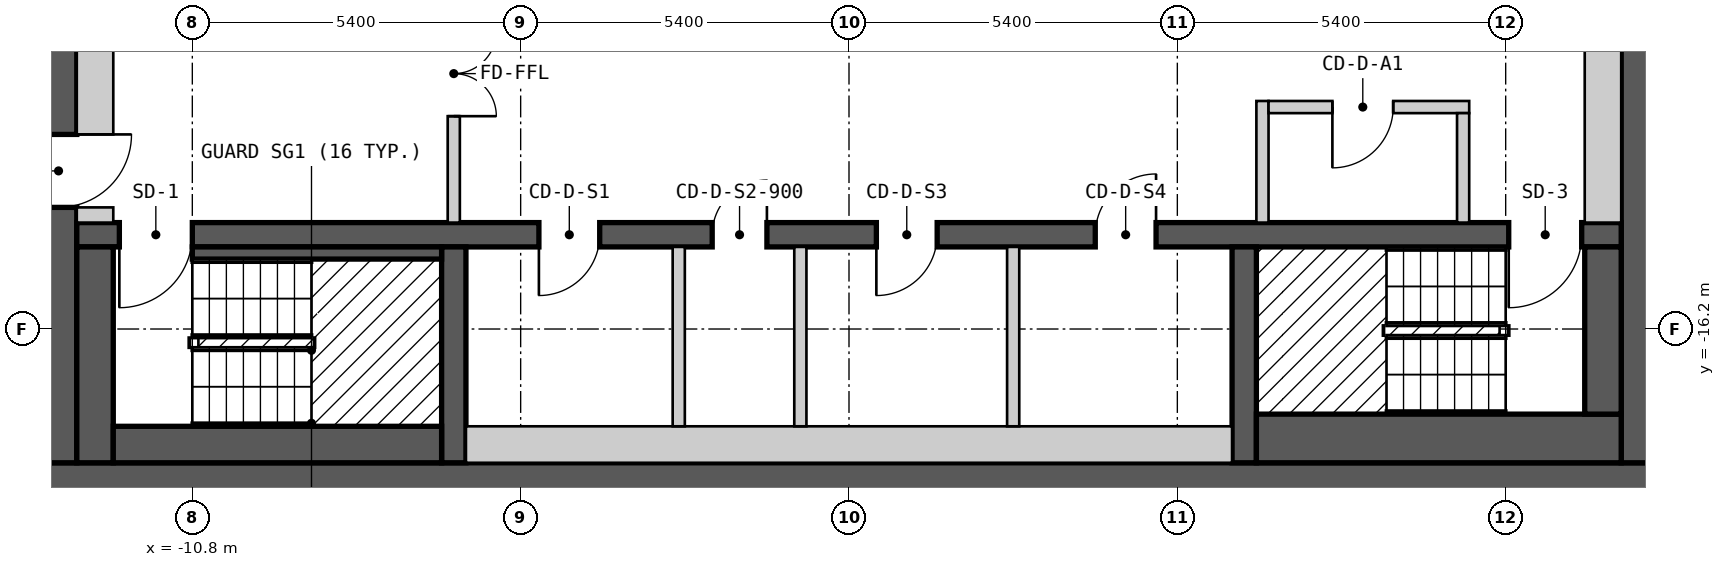
"""IFC4 building model, lengths in metres.
Left out: names, types, materials, properties, quantities, classifications, styles, units other than length and angle.
Written with IfcOpenShell. Run it as: python <this file> out.ifc"""

import sys

from ifc_helpers import new_model, si_unit, direction, frame, frame_2d, origin, place, context, subcontext, project, spatial, rectangle, extrude, element, fill, save


model = new_model("IFC4")
c1 = context("Model", 3, precision=1e-05, world=origin(), true_north=direction((0.0, 1.0)))
c2 = subcontext(c1, "Body", "Model", "MODEL_VIEW")
j1 = project(units=[si_unit("LENGTHUNIT", "METRE"), si_unit("PLANEANGLEUNIT", "RADIAN")], contexts=[c1])
p1 = place(None, origin())
s1 = spatial("IfcSite", under=j1, at=p1, CompositionType="ELEMENT")
p2 = place(p1, origin())
s2 = spatial("IfcBuilding", under=s1, at=p2, CompositionType="ELEMENT")
p3 = place(p2, frame((0.0, 0.0, 166.2)))
s3 = spatial("IfcBuildingStorey", under=s2, at=p3, CompositionType="ELEMENT", Elevation=166.2)
p4 = place(p3, frame((-13.3, -18.7, 0.0), z_axis=(0.0, 0.0, 1.0), x_axis=(1.0, 0.0, 0.0)))
e1 = element("IfcWall", 1, at=p4, inside=s3, PredefinedType="SHEAR", context=c2, shape_type="SweptSolid", body=[
    extrude(rectangle(XDim=26.6, YDim=0.6, at=frame_2d((13.3, 0.0))), origin(), (0.0, 0.0, 1.0), 2.7),
])
p5 = place(p3, frame((-13.0, -18.4, 0.0), z_axis=(0.0, 0.0, 1.0), x_axis=(0.0, 1.0, 0.0)))
e2 = element("IfcWall", 2, at=p5, inside=s3, PredefinedType="SHEAR", context=c2, shape_type="SweptSolid", body=[
    extrude(rectangle(XDim=12.8, YDim=0.6, at=frame_2d((6.4, 0.0))), origin(), (0.0, 0.0, 1.0), 2.7),
])
p6 = place(p5, frame((4.2, 0.0, 0.0)))
e3 = element("IfcOpeningElement", 3, at=p6, cuts=e2, PredefinedType="OPENING", context=c2, shape_type="SweptSolid", body=[
    extrude(rectangle(XDim=1.2, YDim=2.1, at=frame_2d((0.6, 1.05))), frame((0.0, 0.31, 0.0), z_axis=(0.0, -1.0, 0.0), x_axis=(1.0, 0.0, 0.0)), (0.0, 0.0, 1.0), 0.62),
])
p7 = place(p3, frame((13.0, -18.4, 0.0), z_axis=(0.0, 0.0, 1.0), x_axis=(0.0, 1.0, 0.0)))
e4 = element("IfcWall", 4, at=p7, inside=s3, PredefinedType="SHEAR", context=c2, shape_type="SweptSolid", body=[
    extrude(rectangle(XDim=12.8, YDim=0.6, at=frame_2d((6.4, 0.0))), origin(), (0.0, 0.0, 1.0), 2.7),
])
p8 = place(p3, frame((-12.7, -14.65, 0.0), z_axis=(0.0, 0.0, 1.0), x_axis=(1.0, 0.0, 0.0)))
e5 = element("IfcWall", 5, at=p8, inside=s3, PredefinedType="SHEAR", context=c2, shape_type="SweptSolid", body=[
    extrude(rectangle(XDim=25.4, YDim=0.4, at=frame_2d((12.7, 0.0))), origin(), (0.0, 0.0, 1.0), 2.7),
])
p9 = place(p8, frame((1.9, 0.0, 0.0), z_axis=(0.0, 0.0, 1.0), x_axis=(-1.0, 0.0, 0.0)))
e6 = element("IfcOpeningElement", 6, at=p9, cuts=e5, PredefinedType="OPENING", context=c2, shape_type="SweptSolid", body=[
    extrude(rectangle(XDim=1.2, YDim=2.1, at=frame_2d((0.6, 1.05))), frame((0.0, 0.21, 0.0), z_axis=(0.0, -1.0, 0.0), x_axis=(1.0, 0.0, 0.0)), (0.0, 0.0, 1.0), 0.42),
])
p10 = place(p8, frame((24.75, 0.0, 0.0), z_axis=(0.0, 0.0, 1.0), x_axis=(-1.0, 0.0, 0.0)))
e7 = element("IfcOpeningElement", 7, at=p10, cuts=e5, PredefinedType="OPENING", context=c2, shape_type="SweptSolid", body=[
    extrude(rectangle(XDim=1.2, YDim=2.1, at=frame_2d((0.6, 1.05))), frame((0.0, 0.21, 0.0), z_axis=(0.0, -1.0, 0.0), x_axis=(1.0, 0.0, 0.0)), (0.0, 0.0, 1.0), 0.42),
])
p11 = place(p8, frame((8.6, 0.0, 0.0), z_axis=(0.0, 0.0, 1.0), x_axis=(-1.0, 0.0, 0.0)))
e8 = element("IfcOpeningElement", 8, at=p11, cuts=e5, PredefinedType="OPENING", context=c2, shape_type="SweptSolid", body=[
    extrude(rectangle(XDim=1.0, YDim=2.1, at=frame_2d((0.5, 1.05))), frame((0.0, 0.21, 0.0), z_axis=(0.0, -1.0, 0.0), x_axis=(1.0, 0.0, 0.0)), (0.0, 0.0, 1.0), 0.42),
])
p12 = place(p8, frame((11.35, 0.0, 0.0), z_axis=(0.0, 0.0, 1.0), x_axis=(-1.0, 0.0, 0.0)))
e9 = element("IfcOpeningElement", 9, at=p12, cuts=e5, PredefinedType="OPENING", context=c2, shape_type="SweptSolid", body=[
    extrude(rectangle(XDim=0.9, YDim=2.1, at=frame_2d((0.45, 1.05))), frame((0.0, 0.21, 0.0), z_axis=(0.0, -1.0, 0.0), x_axis=(1.0, 0.0, 0.0)), (0.0, 0.0, 1.0), 0.42),
])
p13 = place(p8, frame((14.15, 0.0, 0.0), z_axis=(0.0, 0.0, 1.0), x_axis=(-1.0, 0.0, 0.0)))
e10 = element("IfcOpeningElement", 10, at=p13, cuts=e5, PredefinedType="OPENING", context=c2, shape_type="SweptSolid", body=[
    extrude(rectangle(XDim=1.0, YDim=2.1, at=frame_2d((0.5, 1.05))), frame((0.0, 0.21, 0.0), z_axis=(0.0, -1.0, 0.0), x_axis=(1.0, 0.0, 0.0)), (0.0, 0.0, 1.0), 0.42),
])
p14 = place(p8, frame((17.75, 0.0, 0.0), z_axis=(0.0, 0.0, 1.0), x_axis=(-1.0, 0.0, 0.0)))
e11 = element("IfcOpeningElement", 11, at=p14, cuts=e5, PredefinedType="OPENING", context=c2, shape_type="SweptSolid", body=[
    extrude(rectangle(XDim=1.0, YDim=2.1, at=frame_2d((0.5, 1.05))), frame((0.0, 0.21, 0.0), z_axis=(0.0, -1.0, 0.0), x_axis=(1.0, 0.0, 0.0)), (0.0, 0.0, 1.0), 0.42),
])
for number, where, z_axis, x_axis in (
    (12, (-6.5, -18.4, 0.0), (0.0, 0.0, 1.0), (0.0, 1.0, 0.0)),
    (13, (6.5, -18.4, 0.0), (0.0, 0.0, 1.0), (0.0, 1.0, 0.0)),
):
    element("IfcWall", number, at=place(p3, frame(where, z_axis=z_axis, x_axis=x_axis)), inside=s3, PredefinedType="SHEAR", context=c2, shape_type="SweptSolid", body=[
        extrude(rectangle(XDim=3.55, YDim=0.4, at=frame_2d((1.775, 0.0))), origin(), (0.0, 0.0, 1.0), 2.7),
    ])
p15 = place(p3, frame((-12.4, -18.4, 0.0), z_axis=(0.0, 0.0, 1.0), x_axis=(0.0, 1.0, 0.0)))
e14 = element("IfcWall", 14, at=p15, inside=s3, PredefinedType="SOLIDWALL", context=c2, shape_type="SweptSolid", body=[
    extrude(rectangle(XDim=3.55, YDim=0.6, at=frame_2d((1.775, 0.0))), origin(), (0.0, 0.0, 1.0), 2.7),
])
p16 = place(p3, frame((-12.7, -14.325, 0.0), z_axis=(0.0, 0.0, 1.0), x_axis=(1.0, 0.0, 0.0)))
e15 = element("IfcWall", 15, at=p16, inside=s3, PredefinedType="PARTITIONING", context=c2, shape_type="SweptSolid", body=[
    extrude(rectangle(XDim=0.6, YDim=0.25, at=frame_2d((0.3, 0.0))), origin(), (0.0, 0.0, 1.0), 2.7),
])
p17 = place(p3, frame((-12.4, -13.0, 0.0), z_axis=(0.0, 0.0, 1.0), x_axis=(0.0, 1.0, 0.0)))
e16 = element("IfcWall", 16, at=p17, inside=s3, PredefinedType="PARTITIONING", context=c2, shape_type="SweptSolid", body=[
    extrude(rectangle(XDim=3.45, YDim=0.6, at=frame_2d((1.725, 0.0))), origin(), (0.0, 0.0, 1.0), 2.7),
])
p18 = place(p3, frame((-12.1, -18.1, 0.0), z_axis=(0.0, 0.0, 1.0), x_axis=(1.0, 0.0, 0.0)))
e17 = element("IfcWall", 17, at=p18, inside=s3, PredefinedType="SOLIDWALL", context=c2, shape_type="SweptSolid", body=[
    extrude(rectangle(XDim=5.4, YDim=0.6, at=frame_2d((2.7, 0.0))), origin(), (0.0, 0.0, 1.0), 2.7),
])
p19 = place(p3, frame((-10.8, -14.95, 0.0), z_axis=(0.0, 0.0, 1.0), x_axis=(1.0, 0.0, 0.0)))
e18 = element("IfcWall", 18, at=p19, inside=s3, PredefinedType="SOLIDWALL", context=c2, shape_type="SweptSolid", body=[
    extrude(rectangle(XDim=4.1, YDim=0.2, at=frame_2d((2.05, 0.0))), origin(), (0.0, 0.0, 1.0), 2.7),
])
p20 = place(p3, frame((-6.5, -14.45, 0.0), z_axis=(0.0, 0.0, 1.0), x_axis=(0.0, 1.0, 0.0)))
e19 = element("IfcWall", 19, at=p20, inside=s3, PredefinedType="PARTITIONING", context=c2, shape_type="SweptSolid", body=[
    extrude(rectangle(XDim=4.9, YDim=0.2, at=frame_2d((2.45, 0.0))), origin(), (0.0, 0.0, 1.0), 2.7),
])
p21 = place(p20, frame((3.15, 0.0, 0.0), z_axis=(0.0, 0.0, 1.0), x_axis=(-1.0, 0.0, 0.0)))
e20 = element("IfcOpeningElement", 20, at=p21, cuts=e19, PredefinedType="OPENING", context=c2, shape_type="SweptSolid", body=[
    extrude(rectangle(XDim=1.4, YDim=2.1, at=frame_2d((0.7, 1.05))), frame((0.0, 0.11, 0.0), z_axis=(0.0, -1.0, 0.0), x_axis=(1.0, 0.0, 0.0)), (0.0, 0.0, 1.0), 0.22),
])
p22 = place(p3, frame((-6.3, -18.1, 0.0), z_axis=(0.0, 0.0, 1.0), x_axis=(1.0, 0.0, 0.0)))
e21 = element("IfcWall", 21, at=p22, inside=s3, PredefinedType="PARTITIONING", context=c2, shape_type="SweptSolid", body=[
    extrude(rectangle(XDim=12.6, YDim=0.6, at=frame_2d((6.3, 0.0))), origin(), (0.0, 0.0, 1.0), 2.7),
])
for number, where, z_axis, x_axis in (
    (22, (-2.8, -17.8, 0.0), (0.0, 0.0, 1.0), (0.0, 1.0, 0.0)),
    (23, (-0.8, -17.8, 0.0), (0.0, 0.0, 1.0), (0.0, 1.0, 0.0)),
    (24, (2.7, -17.8, 0.0), (0.0, 0.0, 1.0), (0.0, 1.0, 0.0)),
):
    element("IfcWall", number, at=place(p3, frame(where, z_axis=z_axis, x_axis=x_axis)), inside=s3, PredefinedType="PARTITIONING", context=c2, shape_type="SweptSolid", body=[
        extrude(rectangle(XDim=2.95, YDim=0.2, at=frame_2d((1.475, 0.0))), origin(), (0.0, 0.0, 1.0), 2.7),
    ])
p23 = place(p3, frame((6.7, -18.0, 0.0), z_axis=(0.0, 0.0, 1.0), x_axis=(1.0, 0.0, 0.0)))
e25 = element("IfcWall", 25, at=p23, inside=s3, PredefinedType="SOLIDWALL", context=c2, shape_type="SweptSolid", body=[
    extrude(rectangle(XDim=6.0, YDim=0.8, at=frame_2d((3.0, 0.0))), origin(), (0.0, 0.0, 1.0), 2.7),
])
p24 = place(p3, frame((6.8, -14.45, 0.0), z_axis=(0.0, 0.0, 1.0), x_axis=(0.0, 1.0, 0.0)))
e26 = element("IfcWall", 26, at=p24, inside=s3, PredefinedType="PARTITIONING", context=c2, shape_type="SweptSolid", body=[
    extrude(rectangle(XDim=2.0, YDim=0.2, at=frame_2d((1.0, 0.0))), origin(), (0.0, 0.0, 1.0), 2.7),
])
p25 = place(p3, frame((6.9, -12.55, 0.0), z_axis=(0.0, 0.0, 1.0), x_axis=(1.0, 0.0, 0.0)))
e27 = element("IfcWall", 27, at=p25, inside=s3, PredefinedType="PARTITIONING", context=c2, shape_type="SweptSolid", body=[
    extrude(rectangle(XDim=3.3, YDim=0.2, at=frame_2d((1.65, 0.0))), origin(), (0.0, 0.0, 1.0), 2.7),
])
p26 = place(p25, frame((2.05, 0.0, 0.0), z_axis=(0.0, 0.0, 1.0), x_axis=(-1.0, 0.0, 0.0)))
e28 = element("IfcOpeningElement", 28, at=p26, cuts=e27, PredefinedType="OPENING", context=c2, shape_type="SweptSolid", body=[
    extrude(rectangle(XDim=1.0, YDim=2.1, at=frame_2d((0.5, 1.05))), frame((0.0, 0.11, 0.0), z_axis=(0.0, -1.0, 0.0), x_axis=(1.0, 0.0, 0.0)), (0.0, 0.0, 1.0), 0.22),
])
p27 = place(p3, frame((10.1, -14.45, 0.0), z_axis=(0.0, 0.0, 1.0), x_axis=(0.0, 1.0, 0.0)))
e29 = element("IfcWall", 29, at=p27, inside=s3, PredefinedType="PARTITIONING", context=c2, shape_type="SweptSolid", body=[
    extrude(rectangle(XDim=1.8, YDim=0.2, at=frame_2d((0.9, 0.0))), origin(), (0.0, 0.0, 1.0), 2.7),
])
p28 = place(p3, frame((12.4, -17.6, 0.0), z_axis=(0.0, 0.0, 1.0), x_axis=(0.0, 1.0, 0.0)))
e30 = element("IfcWall", 30, at=p28, inside=s3, PredefinedType="SOLIDWALL", context=c2, shape_type="SweptSolid", body=[
    extrude(rectangle(XDim=2.75, YDim=0.6, at=frame_2d((1.375, 0.0))), origin(), (0.0, 0.0, 1.0), 2.7),
])
p29 = place(p3, frame((12.4, -14.45, 0.0), z_axis=(0.0, 0.0, 1.0), x_axis=(0.0, 1.0, 0.0)))
e31 = element("IfcWall", 31, at=p29, inside=s3, PredefinedType="PARTITIONING", context=c2, shape_type="SweptSolid", body=[
    extrude(rectangle(XDim=8.25, YDim=0.6, at=frame_2d((4.125, 0.0))), origin(), (0.0, 0.0, 1.0), 2.7),
])
p30 = place(p9, origin())
e32 = element("IfcDoor", 32, at=p30, inside=s3, OperationType="SINGLE_SWING_RIGHT", PredefinedType="DOOR", context=c2, shape_type="SweptSolid", body=[
    extrude(rectangle(XDim=1.2, YDim=2.1, at=frame_2d((0.6, 1.05))), frame((0.0, 0.025, 0.0), z_axis=(0.0, -1.0, 0.0), x_axis=(1.0, 0.0, 0.0)), (0.0, 0.0, 1.0), 0.05),
])
fill(e6, e32)
p31 = place(p10, origin())
e33 = element("IfcDoor", 33, at=p31, inside=s3, OperationType="SINGLE_SWING_RIGHT", PredefinedType="DOOR", context=c2, shape_type="SweptSolid", body=[
    extrude(rectangle(XDim=1.2, YDim=2.1, at=frame_2d((0.6, 1.05))), frame((0.0, 0.025, 0.0), z_axis=(0.0, -1.0, 0.0), x_axis=(1.0, 0.0, 0.0)), (0.0, 0.0, 1.0), 0.05),
])
fill(e7, e33)
p32 = place(p6, origin())
e34 = element("IfcDoor", 34, at=p32, inside=s3, OperationType="SINGLE_SWING_RIGHT", PredefinedType="DOOR", context=c2, shape_type="SweptSolid", body=[
    extrude(rectangle(XDim=1.2, YDim=2.1, at=frame_2d((0.6, 1.05))), frame((0.0, 0.025, 0.0), z_axis=(0.0, -1.0, 0.0), x_axis=(1.0, 0.0, 0.0)), (0.0, 0.0, 1.0), 0.05),
])
fill(e3, e34)
p33 = place(p21, origin())
e35 = element("IfcDoor", 35, at=p33, inside=s3, OperationType="DOUBLE_DOOR_SINGLE_SWING", PredefinedType="DOOR", context=c2, shape_type="SweptSolid", body=[
    extrude(rectangle(XDim=1.4, YDim=2.1, at=frame_2d((0.7, 1.05))), frame((0.0, 0.025, 0.0), z_axis=(0.0, -1.0, 0.0), x_axis=(1.0, 0.0, 0.0)), (0.0, 0.0, 1.0), 0.05),
])
fill(e20, e35)
p34 = place(p26, origin())
e36 = element("IfcDoor", 36, at=p34, inside=s3, OperationType="SINGLE_SWING_RIGHT", PredefinedType="DOOR", context=c2, shape_type="SweptSolid", body=[
    extrude(rectangle(XDim=1.0, YDim=2.1, at=frame_2d((0.5, 1.05))), frame((0.0, 0.025, 0.0), z_axis=(0.0, -1.0, 0.0), x_axis=(1.0, 0.0, 0.0)), (0.0, 0.0, 1.0), 0.05),
])
fill(e28, e36)
p35 = place(p11, origin())
e37 = element("IfcDoor", 37, at=p35, inside=s3, OperationType="SINGLE_SWING_RIGHT", PredefinedType="DOOR", context=c2, shape_type="SweptSolid", body=[
    extrude(rectangle(XDim=1.0, YDim=2.1, at=frame_2d((0.5, 1.05))), frame((0.0, 0.025, 0.0), z_axis=(0.0, -1.0, 0.0), x_axis=(1.0, 0.0, 0.0)), (0.0, 0.0, 1.0), 0.05),
])
fill(e8, e37)
p36 = place(p12, origin())
e38 = element("IfcDoor", 38, at=p36, inside=s3, OperationType="SINGLE_SWING_LEFT", PredefinedType="DOOR", context=c2, shape_type="SweptSolid", body=[
    extrude(rectangle(XDim=0.9, YDim=2.1, at=frame_2d((0.45, 1.05))), frame((0.0, 0.025, 0.0), z_axis=(0.0, -1.0, 0.0), x_axis=(1.0, 0.0, 0.0)), (0.0, 0.0, 1.0), 0.05),
])
fill(e9, e38)
p37 = place(p13, origin())
e39 = element("IfcDoor", 39, at=p37, inside=s3, OperationType="SINGLE_SWING_RIGHT", PredefinedType="DOOR", context=c2, shape_type="SweptSolid", body=[
    extrude(rectangle(XDim=1.0, YDim=2.1, at=frame_2d((0.5, 1.05))), frame((0.0, 0.025, 0.0), z_axis=(0.0, -1.0, 0.0), x_axis=(1.0, 0.0, 0.0)), (0.0, 0.0, 1.0), 0.05),
])
fill(e10, e39)
p38 = place(p14, origin())
e40 = element("IfcDoor", 40, at=p38, inside=s3, OperationType="SINGLE_SWING_LEFT", PredefinedType="DOOR", context=c2, shape_type="SweptSolid", body=[
    extrude(rectangle(XDim=1.0, YDim=2.1, at=frame_2d((0.5, 1.05))), frame((0.0, 0.025, 0.0), z_axis=(0.0, -1.0, 0.0), x_axis=(1.0, 0.0, 0.0)), (0.0, 0.0, 1.0), 0.05),
])
fill(e11, e40)
save(model, sys.argv[1])
